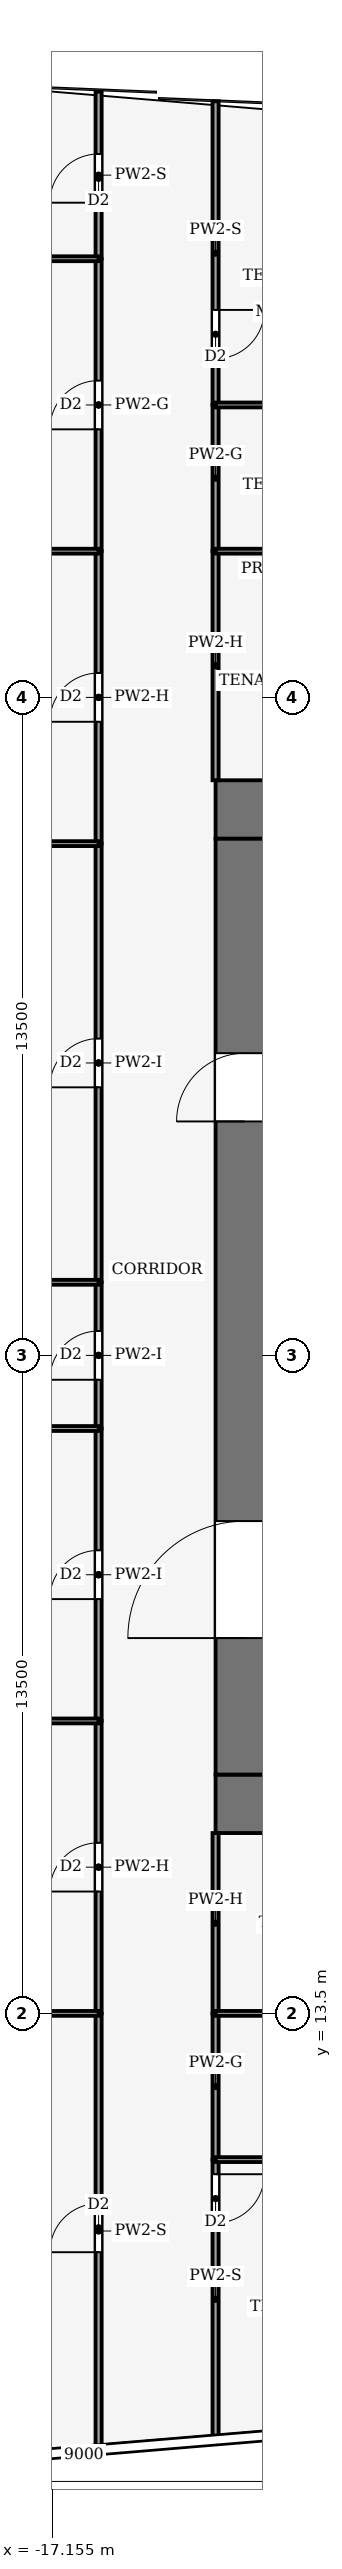
"""IFC4 building model, lengths in metres.
Left out: names, types, materials, properties, quantities, classifications, styles, units other than length and angle.
Written with IfcOpenShell. Run it as: python <this file> out.ifc"""

import sys

from ifc_helpers import new_model, si_unit, direction, frame, frame_2d, origin, place, context, subcontext, project, spatial, rectangle, extrude, element, fill, save


model = new_model("IFC4")
c1 = context("Model", 3, precision=1e-05, world=origin(), true_north=direction((0.0, 1.0)))
c2 = subcontext(c1, "Body", "Model", "MODEL_VIEW")
j1 = project(units=[si_unit("LENGTHUNIT", "METRE"), si_unit("PLANEANGLEUNIT", "RADIAN")], contexts=[c1])
p1 = place(None, origin())
s1 = spatial("IfcSite", under=j1, at=p1, CompositionType="ELEMENT")
p2 = place(p1, origin())
s2 = spatial("IfcBuilding", under=s1, at=p2, CompositionType="ELEMENT")
p3 = place(p2, frame((0.0, 0.0, 74.0)))
s3 = spatial("IfcBuildingStorey", under=s2, at=p3, CompositionType="ELEMENT", Elevation=74.0)
for number, where, z_axis, x_axis in (
    (1, (-13.8, 17.8, -0.13), (0.0, 0.0, 1.0), (1.0, 0.0, 0.0)),
    (2, (-13.8, 38.2, -0.13), (0.0, 0.0, 1.0), (1.0, 0.0, 0.0)),
):
    element("IfcWall", number, at=place(p3, frame(where, z_axis=z_axis, x_axis=x_axis)), inside=s3, PredefinedType="SHEAR", context=c2, shape_type="SweptSolid", body=[
        extrude(rectangle(XDim=27.6, YDim=1.2, at=frame_2d((13.8, 0.0))), origin(), (0.0, 0.0, 1.0), 4.0),
    ])
p4 = place(p3, frame((-13.2, 18.4, -0.13), z_axis=(0.0, 0.0, 1.0), x_axis=(0.0, 1.0, 0.0)))
e3 = element("IfcWall", 3, at=p4, inside=s3, PredefinedType="SHEAR", context=c2, shape_type="SweptSolid", body=[
    extrude(rectangle(XDim=19.2, YDim=1.2, at=frame_2d((9.6, 0.0))), origin(), (0.0, 0.0, 1.0), 4.0),
])
p5 = place(p4, frame((2.8, 0.0, 0.13)))
e4 = element("IfcOpeningElement", 4, at=p5, cuts=e3, PredefinedType="OPENING", context=c2, shape_type="SweptSolid", body=[
    extrude(rectangle(XDim=2.4, YDim=2.4, at=frame_2d((1.2, 1.2))), frame((0.0, 0.61, 0.0), z_axis=(0.0, -1.0, 0.0), x_axis=(1.0, 0.0, 0.0)), (0.0, 0.0, 1.0), 1.22),
])
p6 = place(p4, frame((13.4, 0.0, 0.13)))
e5 = element("IfcOpeningElement", 5, at=p6, cuts=e3, PredefinedType="OPENING", context=c2, shape_type="SweptSolid", body=[
    extrude(rectangle(XDim=1.4, YDim=2.2, at=frame_2d((0.7, 1.1))), frame((0.0, 0.61, 0.0), z_axis=(0.0, -1.0, 0.0), x_axis=(1.0, 0.0, 0.0)), (0.0, 0.0, 1.0), 1.22),
])
p7 = place(p3, frame((-16.2, 4.57, 0.0), z_axis=(0.0, 0.0, 1.0), x_axis=(0.0, 1.0, 0.0)))
e6 = element("IfcWall", 6, at=p7, inside=s3, PredefinedType="PARTITIONING", context=c2, shape_type="SweptSolid", body=[
    extrude(rectangle(XDim=8.93, YDim=0.125, at=frame_2d((4.465, 0.0))), origin(), (0.0, 0.0, 1.0), 3.04),
])
p8 = place(p7, frame((4.03, 0.0, 0.0)))
e7 = element("IfcOpeningElement", 7, at=p8, cuts=e6, PredefinedType="OPENING", context=c2, shape_type="SweptSolid", body=[
    extrude(rectangle(XDim=1.0, YDim=2.1, at=frame_2d((0.5, 1.05))), frame((0.0, 0.073, 0.0), z_axis=(0.0, -1.0, 0.0), x_axis=(1.0, 0.0, 0.0)), (0.0, 0.0, 1.0), 0.145),
])
p9 = place(p3, frame((-16.2, 13.5, 0.0), z_axis=(0.0, 0.0, 1.0), x_axis=(0.0, 1.0, 0.0)))
e8 = element("IfcWall", 8, at=p9, inside=s3, PredefinedType="PARTITIONING", context=c2, shape_type="SweptSolid", body=[
    extrude(rectangle(XDim=6.0, YDim=0.125, at=frame_2d((3.0, 0.0))), origin(), (0.0, 0.0, 1.0), 3.14),
])
p10 = place(p9, frame((2.5, 0.0, 0.0)))
e9 = element("IfcOpeningElement", 9, at=p10, cuts=e8, PredefinedType="OPENING", context=c2, shape_type="SweptSolid", body=[
    extrude(rectangle(XDim=1.0, YDim=2.1, at=frame_2d((0.5, 1.05))), frame((0.0, 0.073, 0.0), z_axis=(0.0, -1.0, 0.0), x_axis=(1.0, 0.0, 0.0)), (0.0, 0.0, 1.0), 0.145),
])
p11 = place(p3, frame((-16.2, 19.5, 0.0), z_axis=(0.0, 0.0, 1.0), x_axis=(0.0, 1.0, 0.0)))
e10 = element("IfcWall", 10, at=p11, inside=s3, PredefinedType="PARTITIONING", context=c2, shape_type="SweptSolid", body=[
    extrude(rectangle(XDim=6.0, YDim=0.125, at=frame_2d((3.0, 0.0))), origin(), (0.0, 0.0, 1.0), 3.48),
])
p12 = place(p11, frame((2.5, 0.0, 0.0)))
e11 = element("IfcOpeningElement", 11, at=p12, cuts=e10, PredefinedType="OPENING", context=c2, shape_type="SweptSolid", body=[
    extrude(rectangle(XDim=1.0, YDim=2.1, at=frame_2d((0.5, 1.05))), frame((0.0, 0.073, 0.0), z_axis=(0.0, -1.0, 0.0), x_axis=(1.0, 0.0, 0.0)), (0.0, 0.0, 1.0), 0.145),
])
p13 = place(p3, frame((-16.2, 25.5, 0.0), z_axis=(0.0, 0.0, 1.0), x_axis=(0.0, 1.0, 0.0)))
e12 = element("IfcWall", 12, at=p13, inside=s3, PredefinedType="PARTITIONING", context=c2, shape_type="SweptSolid", body=[
    extrude(rectangle(XDim=3.0, YDim=0.125, at=frame_2d((1.5, 0.0))), origin(), (0.0, 0.0, 1.0), 3.48),
])
p14 = place(p13, frame((1.0, 0.0, 0.0)))
e13 = element("IfcOpeningElement", 13, at=p14, cuts=e12, PredefinedType="OPENING", context=c2, shape_type="SweptSolid", body=[
    extrude(rectangle(XDim=1.0, YDim=2.1, at=frame_2d((0.5, 1.05))), frame((0.0, 0.073, 0.0), z_axis=(0.0, -1.0, 0.0), x_axis=(1.0, 0.0, 0.0)), (0.0, 0.0, 1.0), 0.145),
])
p15 = place(p3, frame((-16.2, 28.5, 0.0), z_axis=(0.0, 0.0, 1.0), x_axis=(0.0, 1.0, 0.0)))
e14 = element("IfcWall", 14, at=p15, inside=s3, PredefinedType="PARTITIONING", context=c2, shape_type="SweptSolid", body=[
    extrude(rectangle(XDim=9.0, YDim=0.125, at=frame_2d((4.5, 0.0))), origin(), (0.0, 0.0, 1.0), 3.48),
])
p16 = place(p15, frame((4.0, 0.0, 0.0)))
e15 = element("IfcOpeningElement", 15, at=p16, cuts=e14, PredefinedType="OPENING", context=c2, shape_type="SweptSolid", body=[
    extrude(rectangle(XDim=1.0, YDim=2.1, at=frame_2d((0.5, 1.05))), frame((0.0, 0.073, 0.0), z_axis=(0.0, -1.0, 0.0), x_axis=(1.0, 0.0, 0.0)), (0.0, 0.0, 1.0), 0.145),
])
p17 = place(p3, frame((-16.2, 37.5, 0.0), z_axis=(0.0, 0.0, 1.0), x_axis=(0.0, 1.0, 0.0)))
e16 = element("IfcWall", 16, at=p17, inside=s3, PredefinedType="PARTITIONING", context=c2, shape_type="SweptSolid", body=[
    extrude(rectangle(XDim=6.0, YDim=0.125, at=frame_2d((3.0, 0.0))), origin(), (0.0, 0.0, 1.0), 3.14),
])
p18 = place(p17, frame((2.5, 0.0, 0.0)))
e17 = element("IfcOpeningElement", 17, at=p18, cuts=e16, PredefinedType="OPENING", context=c2, shape_type="SweptSolid", body=[
    extrude(rectangle(XDim=1.0, YDim=2.1, at=frame_2d((0.5, 1.05))), frame((0.0, 0.073, 0.0), z_axis=(0.0, -1.0, 0.0), x_axis=(1.0, 0.0, 0.0)), (0.0, 0.0, 1.0), 0.145),
])
p19 = place(p3, frame((-16.2, 43.5, 0.0), z_axis=(0.0, 0.0, 1.0), x_axis=(0.0, 1.0, 0.0)))
e18 = element("IfcWall", 18, at=p19, inside=s3, PredefinedType="PARTITIONING", context=c2, shape_type="SweptSolid", body=[
    extrude(rectangle(XDim=6.0, YDim=0.125, at=frame_2d((3.0, 0.0))), origin(), (0.0, 0.0, 1.0), 3.87),
])
p20 = place(p19, frame((2.5, 0.0, 0.0)))
e19 = element("IfcOpeningElement", 19, at=p20, cuts=e18, PredefinedType="OPENING", context=c2, shape_type="SweptSolid", body=[
    extrude(rectangle(XDim=1.0, YDim=2.1, at=frame_2d((0.5, 1.05))), frame((0.0, 0.073, 0.0), z_axis=(0.0, -1.0, 0.0), x_axis=(1.0, 0.0, 0.0)), (0.0, 0.0, 1.0), 0.145),
])
p21 = place(p3, frame((-16.2, 49.5, 0.0), z_axis=(0.0, 0.0, 1.0), x_axis=(0.0, 1.0, 0.0)))
e20 = element("IfcWall", 20, at=p21, inside=s3, PredefinedType="PARTITIONING", context=c2, shape_type="SweptSolid", body=[
    extrude(rectangle(XDim=3.43, YDim=0.125, at=frame_2d((1.715, 0.0))), origin(), (0.0, 0.0, 1.0), 3.04),
])
p22 = place(p21, frame((1.15, 0.0, 0.0)))
e21 = element("IfcOpeningElement", 21, at=p22, cuts=e20, PredefinedType="OPENING", context=c2, shape_type="SweptSolid", body=[
    extrude(rectangle(XDim=1.0, YDim=2.1, at=frame_2d((0.5, 1.05))), frame((0.0, 0.073, 0.0), z_axis=(0.0, -1.0, 0.0), x_axis=(1.0, 0.0, 0.0)), (0.0, 0.0, 1.0), 0.145),
])
p23 = place(p3, frame((-13.8, 10.5, 0.0), z_axis=(0.0, 0.0, 1.0), x_axis=(0.0, -1.0, 0.0)))
e22 = element("IfcWall", 22, at=p23, inside=s3, PredefinedType="PARTITIONING", context=c2, shape_type="SweptSolid", body=[
    extrude(rectangle(XDim=5.73, YDim=0.125, at=frame_2d((2.865, 0.0))), origin(), (0.0, 0.0, 1.0), 3.04),
])
p24 = place(p23, frame((0.3, 0.0, 0.0)))
e23 = element("IfcOpeningElement", 23, at=p24, cuts=e22, PredefinedType="OPENING", context=c2, shape_type="SweptSolid", body=[
    extrude(rectangle(XDim=1.0, YDim=2.1, at=frame_2d((0.5, 1.05))), frame((0.0, 0.073, 0.0), z_axis=(0.0, -1.0, 0.0), x_axis=(1.0, 0.0, 0.0)), (0.0, 0.0, 1.0), 0.145),
])
p25 = place(p3, frame((-13.8, 10.5, 0.0), z_axis=(0.0, 0.0, 1.0), x_axis=(0.0, 1.0, 0.0)))
e24 = element("IfcWall", 24, at=p25, inside=s3, PredefinedType="PARTITIONING", context=c2, shape_type="SweptSolid", body=[
    extrude(rectangle(XDim=3.0, YDim=0.125, at=frame_2d((1.5, 0.0))), origin(), (0.0, 0.0, 1.0), 3.87),
])
p26 = place(p3, frame((-13.8, 13.5, 0.0), z_axis=(0.0, 0.0, 1.0), x_axis=(0.0, 1.0, 0.0)))
e25 = element("IfcWall", 25, at=p26, inside=s3, PredefinedType="PARTITIONING", context=c2, shape_type="SweptSolid", body=[
    extrude(rectangle(XDim=3.7, YDim=0.125, at=frame_2d((1.85, 0.0))), origin(), (0.0, 0.0, 1.0), 3.14),
])
p27 = place(p3, frame((-13.8, 38.8, 0.0), z_axis=(0.0, 0.0, 1.0), x_axis=(0.0, 1.0, 0.0)))
e26 = element("IfcWall", 26, at=p27, inside=s3, PredefinedType="PARTITIONING", context=c2, shape_type="SweptSolid", body=[
    extrude(rectangle(XDim=4.7, YDim=0.125, at=frame_2d((2.35, 0.0))), origin(), (0.0, 0.0, 1.0), 3.14),
])
p28 = place(p3, frame((-13.8, 43.5, 0.0), z_axis=(0.0, 0.0, 1.0), x_axis=(0.0, 1.0, 0.0)))
e27 = element("IfcWall", 27, at=p28, inside=s3, PredefinedType="PARTITIONING", context=c2, shape_type="SweptSolid", body=[
    extrude(rectangle(XDim=3.0, YDim=0.125, at=frame_2d((1.5, 0.0))), origin(), (0.0, 0.0, 1.0), 3.87),
])
p29 = place(p3, frame((-13.8, 52.73, 0.0), z_axis=(0.0, 0.0, 1.0), x_axis=(0.0, -1.0, 0.0)))
e28 = element("IfcWall", 28, at=p29, inside=s3, PredefinedType="PARTITIONING", context=c2, shape_type="SweptSolid", body=[
    extrude(rectangle(XDim=6.23, YDim=0.125, at=frame_2d((3.115, 0.0))), origin(), (0.0, 0.0, 1.0), 3.04),
])
p30 = place(p29, frame((4.28, 0.0, 0.0)))
e29 = element("IfcOpeningElement", 29, at=p30, cuts=e28, PredefinedType="OPENING", context=c2, shape_type="SweptSolid", body=[
    extrude(rectangle(XDim=1.0, YDim=2.1, at=frame_2d((0.5, 1.05))), frame((0.0, 0.073, 0.0), z_axis=(0.0, -1.0, 0.0), x_axis=(1.0, 0.0, 0.0)), (0.0, 0.0, 1.0), 0.145),
])
p31 = place(p3, frame((-16.2, 13.5, 0.0), z_axis=(0.0, 0.0, 1.0), x_axis=(-1.0, 0.0, 0.0)))
e30 = element("IfcWall", 30, at=p31, inside=s3, PredefinedType="PARTITIONING", context=c2, shape_type="SweptSolid", body=[
    extrude(rectangle(XDim=7.634, YDim=0.1, at=frame_2d((3.817, 0.0))), origin(), (0.0, 0.0, 1.0), 3.04),
])
p32 = place(p3, frame((-16.2, 19.5, 0.0), z_axis=(0.0, 0.0, 1.0), x_axis=(-1.0, 0.0, 0.0)))
e31 = element("IfcWall", 31, at=p32, inside=s3, PredefinedType="PARTITIONING", context=c2, shape_type="SweptSolid", body=[
    extrude(rectangle(XDim=7.14, YDim=0.1, at=frame_2d((3.57, 0.0))), origin(), (0.0, 0.0, 1.0), 3.04),
])
p33 = place(p3, frame((-16.2, 25.5, 0.0), z_axis=(0.0, 0.0, 1.0), x_axis=(-1.0, 0.0, 0.0)))
e32 = element("IfcWall", 32, at=p33, inside=s3, PredefinedType="PARTITIONING", context=c2, shape_type="SweptSolid", body=[
    extrude(rectangle(XDim=6.647, YDim=0.1, at=frame_2d((3.324, 0.0))), origin(), (0.0, 0.0, 1.0), 3.04),
])
p34 = place(p3, frame((-16.2, 28.5, 0.0), z_axis=(0.0, 0.0, 1.0), x_axis=(-1.0, 0.0, 0.0)))
e33 = element("IfcWall", 33, at=p34, inside=s3, PredefinedType="PARTITIONING", context=c2, shape_type="SweptSolid", body=[
    extrude(rectangle(XDim=6.401, YDim=0.1, at=frame_2d((3.2, 0.0))), origin(), (0.0, 0.0, 1.0), 3.04),
])
p35 = place(p3, frame((-16.2, 37.5, 0.0), z_axis=(0.0, 0.0, 1.0), x_axis=(-1.0, 0.0, 0.0)))
e34 = element("IfcWall", 34, at=p35, inside=s3, PredefinedType="PARTITIONING", context=c2, shape_type="SweptSolid", body=[
    extrude(rectangle(XDim=7.099, YDim=0.1, at=frame_2d((3.55, 0.0))), origin(), (0.0, 0.0, 1.0), 3.04),
])
p36 = place(p3, frame((-16.2, 43.5, 0.0), z_axis=(0.0, 0.0, 1.0), x_axis=(-1.0, 0.0, 0.0)))
e35 = element("IfcWall", 35, at=p36, inside=s3, PredefinedType="PARTITIONING", context=c2, shape_type="SweptSolid", body=[
    extrude(rectangle(XDim=7.592, YDim=0.1, at=frame_2d((3.796, 0.0))), origin(), (0.0, 0.0, 1.0), 3.04),
])
p37 = place(p3, frame((-16.2, 49.5, 0.0), z_axis=(0.0, 0.0, 1.0), x_axis=(-1.0, 0.0, 0.0)))
e36 = element("IfcWall", 36, at=p37, inside=s3, PredefinedType="PARTITIONING", context=c2, shape_type="SweptSolid", body=[
    extrude(rectangle(XDim=7.287, YDim=0.1, at=frame_2d((3.644, 0.0))), origin(), (0.0, 0.0, 1.0), 3.34),
])
p38 = place(p3, frame((-13.8, 10.5, 0.0), z_axis=(0.0, 0.0, 1.0), x_axis=(1.0, 0.0, 0.0)))
e37 = element("IfcWall", 37, at=p38, inside=s3, PredefinedType="PARTITIONING", context=c2, shape_type="SweptSolid", body=[
    extrude(rectangle(XDim=6.3, YDim=0.1, at=frame_2d((3.15, 0.0))), origin(), (0.0, 0.0, 1.0), 3.39),
])
p39 = place(p38, frame((2.65, 0.0, 0.0)))
e38 = element("IfcOpeningElement", 38, at=p39, cuts=e37, PredefinedType="OPENING", context=c2, shape_type="SweptSolid", body=[
    extrude(rectangle(XDim=1.0, YDim=2.1, at=frame_2d((0.5, 1.05))), frame((0.0, 0.06, 0.0), z_axis=(0.0, -1.0, 0.0), x_axis=(1.0, 0.0, 0.0)), (0.0, 0.0, 1.0), 0.12),
])
p40 = place(p3, frame((-13.8, 13.5, 0.0), z_axis=(0.0, 0.0, 1.0), x_axis=(1.0, 0.0, 0.0)))
e39 = element("IfcWall", 39, at=p40, inside=s3, PredefinedType="PARTITIONING", context=c2, shape_type="SweptSolid", body=[
    extrude(rectangle(XDim=6.3, YDim=0.1, at=frame_2d((3.15, 0.0))), origin(), (0.0, 0.0, 1.0), 3.39),
])
p41 = place(p40, frame((2.65, 0.0, 0.0)))
e40 = element("IfcOpeningElement", 40, at=p41, cuts=e39, PredefinedType="OPENING", context=c2, shape_type="SweptSolid", body=[
    extrude(rectangle(XDim=1.0, YDim=2.1, at=frame_2d((0.5, 1.05))), frame((0.0, 0.06, 0.0), z_axis=(0.0, -1.0, 0.0), x_axis=(1.0, 0.0, 0.0)), (0.0, 0.0, 1.0), 0.12),
])
p42 = place(p3, frame((-10.5, 43.5, 0.0), z_axis=(0.0, 0.0, 1.0), x_axis=(-1.0, 0.0, 0.0)))
e41 = element("IfcWall", 41, at=p42, inside=s3, PredefinedType="PARTITIONING", context=c2, shape_type="SweptSolid", body=[
    extrude(rectangle(XDim=3.3, YDim=0.1, at=frame_2d((1.65, 0.0))), origin(), (0.0, 0.0, 1.0), 3.39),
])
p43 = place(p3, frame((-10.5, 46.5, 0.0), z_axis=(0.0, 0.0, 1.0), x_axis=(-1.0, 0.0, 0.0)))
e42 = element("IfcWall", 42, at=p43, inside=s3, PredefinedType="PARTITIONING", context=c2, shape_type="SweptSolid", body=[
    extrude(rectangle(XDim=3.3, YDim=0.1, at=frame_2d((1.65, 0.0))), origin(), (0.0, 0.0, 1.0), 3.39),
])
p44 = place(p43, frame((0.35, 0.0, 0.0)))
e43 = element("IfcOpeningElement", 43, at=p44, cuts=e42, PredefinedType="OPENING", context=c2, shape_type="SweptSolid", body=[
    extrude(rectangle(XDim=1.0, YDim=2.1, at=frame_2d((0.5, 1.05))), frame((0.0, 0.06, 0.0), z_axis=(0.0, -1.0, 0.0), x_axis=(1.0, 0.0, 0.0)), (0.0, 0.0, 1.0), 0.12),
])
p45 = place(p5, origin())
e44 = element("IfcDoor", 44, at=p45, inside=s3, OperationType="DOUBLE_DOOR_SINGLE_SWING", PredefinedType="DOOR", context=c2, shape_type="SweptSolid", body=[
    extrude(rectangle(XDim=2.4, YDim=2.4, at=frame_2d((1.2, 1.2))), frame((0.0, 0.025, 0.0), z_axis=(0.0, -1.0, 0.0), x_axis=(1.0, 0.0, 0.0)), (0.0, 0.0, 1.0), 0.05),
])
fill(e4, e44)
p46 = place(p6, origin())
e45 = element("IfcDoor", 45, at=p46, inside=s3, OperationType="SINGLE_SWING_RIGHT", PredefinedType="DOOR", context=c2, shape_type="SweptSolid", body=[
    extrude(rectangle(XDim=1.4, YDim=2.2, at=frame_2d((0.7, 1.1))), frame((0.0, 0.025, 0.0), z_axis=(0.0, -1.0, 0.0), x_axis=(1.0, 0.0, 0.0)), (0.0, 0.0, 1.0), 0.05),
])
fill(e5, e45)
p47 = place(p8, origin())
e46 = element("IfcDoor", 46, at=p47, inside=s3, OperationType="SINGLE_SWING_RIGHT", PredefinedType="DOOR", context=c2, shape_type="SweptSolid", body=[
    extrude(rectangle(XDim=1.0, YDim=2.1, at=frame_2d((0.5, 1.05))), frame((0.0, 0.025, 0.0), z_axis=(0.0, -1.0, 0.0), x_axis=(1.0, 0.0, 0.0)), (0.0, 0.0, 1.0), 0.05),
])
fill(e7, e46)
p48 = place(p10, origin())
e47 = element("IfcDoor", 47, at=p48, inside=s3, OperationType="SINGLE_SWING_RIGHT", PredefinedType="DOOR", context=c2, shape_type="SweptSolid", body=[
    extrude(rectangle(XDim=1.0, YDim=2.1, at=frame_2d((0.5, 1.05))), frame((0.0, 0.025, 0.0), z_axis=(0.0, -1.0, 0.0), x_axis=(1.0, 0.0, 0.0)), (0.0, 0.0, 1.0), 0.05),
])
fill(e9, e47)
p49 = place(p12, origin())
e48 = element("IfcDoor", 48, at=p49, inside=s3, OperationType="SINGLE_SWING_LEFT", PredefinedType="DOOR", context=c2, shape_type="SweptSolid", body=[
    extrude(rectangle(XDim=1.0, YDim=2.1, at=frame_2d((0.5, 1.05))), frame((0.0, 0.025, 0.0), z_axis=(0.0, -1.0, 0.0), x_axis=(1.0, 0.0, 0.0)), (0.0, 0.0, 1.0), 0.05),
])
fill(e11, e48)
p50 = place(p14, origin())
e49 = element("IfcDoor", 49, at=p50, inside=s3, OperationType="SINGLE_SWING_RIGHT", PredefinedType="DOOR", context=c2, shape_type="SweptSolid", body=[
    extrude(rectangle(XDim=1.0, YDim=2.1, at=frame_2d((0.5, 1.05))), frame((0.0, 0.025, 0.0), z_axis=(0.0, -1.0, 0.0), x_axis=(1.0, 0.0, 0.0)), (0.0, 0.0, 1.0), 0.05),
])
fill(e13, e49)
p51 = place(p16, origin())
e50 = element("IfcDoor", 50, at=p51, inside=s3, OperationType="SINGLE_SWING_LEFT", PredefinedType="DOOR", context=c2, shape_type="SweptSolid", body=[
    extrude(rectangle(XDim=1.0, YDim=2.1, at=frame_2d((0.5, 1.05))), frame((0.0, 0.025, 0.0), z_axis=(0.0, -1.0, 0.0), x_axis=(1.0, 0.0, 0.0)), (0.0, 0.0, 1.0), 0.05),
])
fill(e15, e50)
p52 = place(p18, origin())
e51 = element("IfcDoor", 51, at=p52, inside=s3, OperationType="SINGLE_SWING_RIGHT", PredefinedType="DOOR", context=c2, shape_type="SweptSolid", body=[
    extrude(rectangle(XDim=1.0, YDim=2.1, at=frame_2d((0.5, 1.05))), frame((0.0, 0.025, 0.0), z_axis=(0.0, -1.0, 0.0), x_axis=(1.0, 0.0, 0.0)), (0.0, 0.0, 1.0), 0.05),
])
fill(e17, e51)
p53 = place(p20, origin())
e52 = element("IfcDoor", 52, at=p53, inside=s3, OperationType="SINGLE_SWING_LEFT", PredefinedType="DOOR", context=c2, shape_type="SweptSolid", body=[
    extrude(rectangle(XDim=1.0, YDim=2.1, at=frame_2d((0.5, 1.05))), frame((0.0, 0.025, 0.0), z_axis=(0.0, -1.0, 0.0), x_axis=(1.0, 0.0, 0.0)), (0.0, 0.0, 1.0), 0.05),
])
fill(e19, e52)
p54 = place(p22, origin())
e53 = element("IfcDoor", 53, at=p54, inside=s3, OperationType="SINGLE_SWING_LEFT", PredefinedType="DOOR", context=c2, shape_type="SweptSolid", body=[
    extrude(rectangle(XDim=1.0, YDim=2.1, at=frame_2d((0.5, 1.05))), frame((0.0, 0.025, 0.0), z_axis=(0.0, -1.0, 0.0), x_axis=(1.0, 0.0, 0.0)), (0.0, 0.0, 1.0), 0.05),
])
fill(e21, e53)
p55 = place(p24, origin())
e54 = element("IfcDoor", 54, at=p55, inside=s3, OperationType="SINGLE_SWING_LEFT", PredefinedType="DOOR", context=c2, shape_type="SweptSolid", body=[
    extrude(rectangle(XDim=1.0, YDim=2.1, at=frame_2d((0.5, 1.05))), frame((0.0, 0.025, 0.0), z_axis=(0.0, -1.0, 0.0), x_axis=(1.0, 0.0, 0.0)), (0.0, 0.0, 1.0), 0.05),
])
fill(e23, e54)
p56 = place(p30, origin())
e55 = element("IfcDoor", 55, at=p56, inside=s3, OperationType="SINGLE_SWING_RIGHT", PredefinedType="DOOR", context=c2, shape_type="SweptSolid", body=[
    extrude(rectangle(XDim=1.0, YDim=2.1, at=frame_2d((0.5, 1.05))), frame((0.0, 0.025, 0.0), z_axis=(0.0, -1.0, 0.0), x_axis=(1.0, 0.0, 0.0)), (0.0, 0.0, 1.0), 0.05),
])
fill(e29, e55)
save(model, sys.argv[1])
